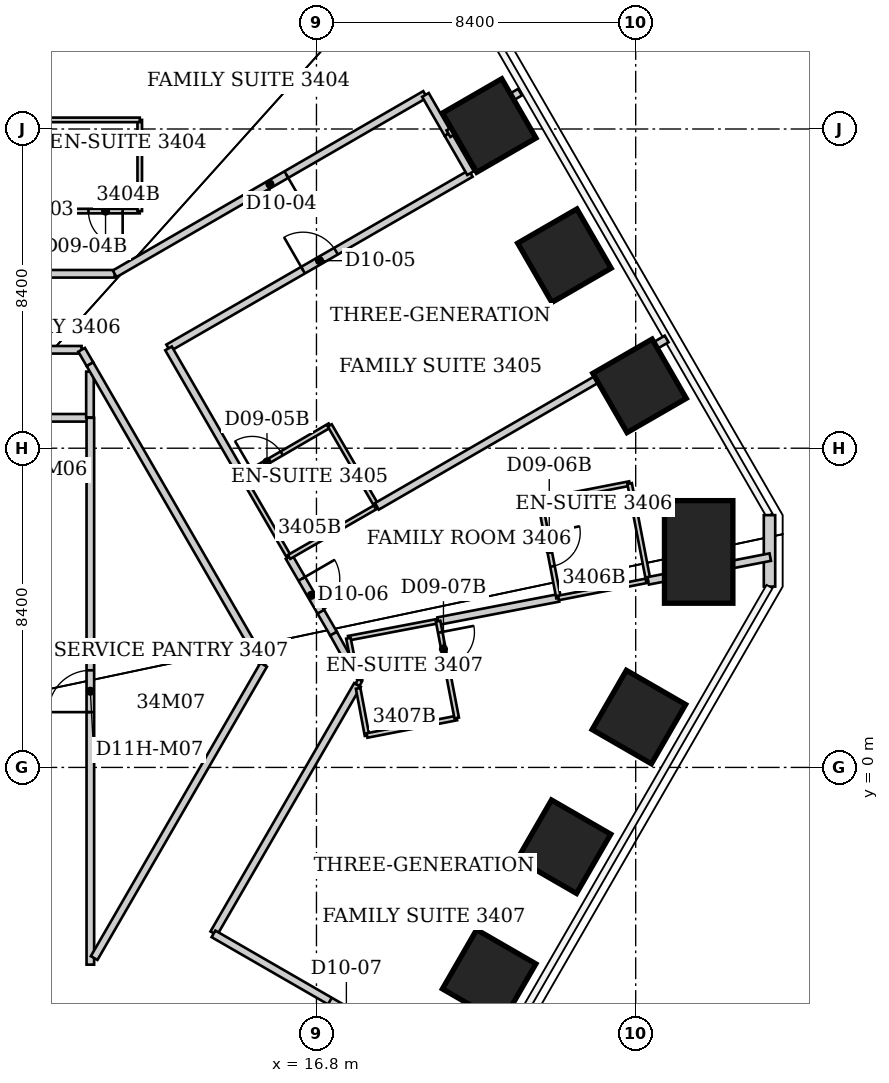
"""IFC4 building model, lengths in metres.
Left out: names, types, materials, properties, quantities, classifications, styles, units other than length and angle.
Written with IfcOpenShell. Run it as: python <this file> out.ifc"""

import sys

from ifc_helpers import new_model, si_unit, direction, frame, frame_2d, origin, origin_2d, place, context, subcontext, project, spatial, rectangle, extrude, element, fill, save


model = new_model("IFC4")
c1 = context("Model", 3, precision=1e-05, world=origin(), true_north=direction((0.0, 1.0)))
c2 = subcontext(c1, "Body", "Model", "MODEL_VIEW")
j1 = project(units=[si_unit("LENGTHUNIT", "METRE"), si_unit("PLANEANGLEUNIT", "RADIAN")], contexts=[c1])
p1 = place(None, origin())
s1 = spatial("IfcSite", under=j1, at=p1, CompositionType="ELEMENT")
p2 = place(p1, origin())
s2 = spatial("IfcBuilding", under=s1, at=p2, CompositionType="ELEMENT")
p3 = place(p2, frame((0.0, 0.0, 138.6)))
s3 = spatial("IfcBuildingStorey", under=s2, at=p3, CompositionType="ELEMENT", Elevation=138.6)
for number, where, z_axis, x_axis in (
    (1, (21.346, 16.891, 0.0), (0.0, 0.0, 1.0), (0.866, 0.5, 0.0)),
    (2, (23.324, 13.466, 0.0), (0.0, 0.0, 1.0), (0.866, 0.5, 0.0)),
    (3, (25.302, 10.041, 0.0), (0.0, 0.0, 1.0), (0.866, 0.5, 0.0)),
):
    element("IfcColumn", number, at=place(p3, frame(where, z_axis=z_axis, x_axis=x_axis)), inside=s3, PredefinedType="COLUMN", context=c2, shape_type="SweptSolid", body=[
        extrude(rectangle(XDim=1.8, YDim=1.8, at=origin_2d()), origin(), (0.0, 0.0, 1.0), 3.8),
    ])
p4 = place(p3, frame((26.857, 5.67, 0.0), z_axis=(0.0, 0.0, 1.0), x_axis=(1.0, 0.0, 0.0)))
e4 = element("IfcColumn", 4, at=p4, inside=s3, PredefinedType="COLUMN", context=c2, shape_type="SweptSolid", body=[
    extrude(rectangle(XDim=1.8, YDim=2.7, at=origin_2d()), origin(), (0.0, 0.0, 1.0), 3.8),
])
for number, where, z_axis, x_axis in (
    (5, (25.284, 1.325, 0.0), (0.0, 0.0, 1.0), (0.866, -0.5, 0.0)),
    (6, (23.314, -2.087, 0.0), (0.0, 0.0, 1.0), (0.866, -0.5, 0.0)),
    (7, (21.344, -5.499, 0.0), (0.0, 0.0, 1.0), (0.866, -0.5, 0.0)),
):
    element("IfcColumn", number, at=place(p3, frame(where, z_axis=z_axis, x_axis=x_axis)), inside=s3, PredefinedType="COLUMN", context=c2, shape_type="SweptSolid", body=[
        extrude(rectangle(XDim=1.8, YDim=1.8, at=origin_2d()), origin(), (0.0, 0.0, 1.0), 3.8),
    ])
p5 = place(p3, frame((28.721, 6.638, 0.0), z_axis=(0.0, 0.0, 1.0), x_axis=(0.0, -1.0, 0.0)))
e8 = element("IfcWall", 8, at=p5, inside=s3, PredefinedType="SOLIDWALL", context=c2, shape_type="SweptSolid", body=[
    extrude(rectangle(XDim=1.88, YDim=0.3, at=frame_2d((0.94, 0.0))), origin(), (0.0, 0.0, 1.0), 3.64),
])
p6 = place(p3, frame((6.27, 10.99, 0.0), z_axis=(0.0, 0.0, 1.0), x_axis=(1.0, 0.0, 0.0)))
e9 = element("IfcWall", 9, at=p6, inside=s3, PredefinedType="PARTITIONING", context=c2, shape_type="SweptSolid", body=[
    extrude(rectangle(XDim=4.35, YDim=0.2, at=frame_2d((2.175, 0.0))), origin(), (0.0, 0.0, 1.0), 3.64),
])
p7 = place(p3, frame((9.55, 14.64, 0.0), z_axis=(0.0, 0.0, 1.0), x_axis=(1.0, 0.0, 0.0)))
e10 = element("IfcWall", 10, at=p7, inside=s3, PredefinedType="PARTITIONING", context=c2, shape_type="SweptSolid", body=[
    extrude(rectangle(XDim=2.6, YDim=0.12, at=frame_2d((1.3, 0.0))), origin(), (0.0, 0.0, 1.0), 3.64),
])
p8 = place(p7, frame((1.25, 0.0, 0.0)))
e11 = element("IfcOpeningElement", 11, at=p8, cuts=e10, PredefinedType="OPENING", context=c2, shape_type="SweptSolid", body=[
    extrude(rectangle(XDim=0.9, YDim=2.03, at=frame_2d((0.45, 1.015))), frame((0.0, 0.06, 0.0), z_axis=(0.0, -1.0, 0.0), x_axis=(1.0, 0.0, 0.0)), (0.0, 0.0, 1.0), 0.12),
])
p9 = place(p3, frame((10.62, 10.99, 0.0), z_axis=(0.0, 0.0, 1.0), x_axis=(0.5011020393, -0.865388205495, 0.0)))
e12 = element("IfcWall", 12, at=p9, inside=s3, PredefinedType="PARTITIONING", context=c2, shape_type="SweptSolid", body=[
    extrude(rectangle(XDim=0.439, YDim=0.2, at=frame_2d((0.219, 0.0))), origin(), (0.0, 0.0, 1.0), 3.64),
])
p10 = place(p3, frame((10.84, 9.2, 0.0), z_axis=(0.0, 0.0, 1.0), x_axis=(-1.0, 0.0, 0.0)))
e13 = element("IfcWall", 13, at=p10, inside=s3, PredefinedType="PARTITIONING", context=c2, shape_type="SweptSolid", body=[
    extrude(rectangle(XDim=4.57, YDim=0.2, at=frame_2d((2.285, 0.0))), origin(), (0.0, 0.0, 1.0), 3.64),
])
p11 = place(p10, frame((1.735, 0.0, 0.0)))
e14 = element("IfcOpeningElement", 14, at=p11, cuts=e13, PredefinedType="OPENING", context=c2, shape_type="SweptSolid", body=[
    extrude(rectangle(XDim=1.1, YDim=2.2, at=frame_2d((0.55, 1.1))), frame((0.0, 0.1, 0.0), z_axis=(0.0, -1.0, 0.0), x_axis=(1.0, 0.0, 0.0)), (0.0, 0.0, 1.0), 0.2),
])
p12 = place(p3, frame((10.84, 10.415, 0.0), z_axis=(0.0, 0.0, 1.0), x_axis=(0.0, -1.0, 0.0)))
e15 = element("IfcWall", 15, at=p12, inside=s3, PredefinedType="PARTITIONING", context=c2, shape_type="SweptSolid", body=[
    extrude(rectangle(XDim=1.205, YDim=0.2, at=frame_2d((0.603, 0.0))), origin(), (0.0, 0.0, 1.0), 3.64),
])
p13 = place(p3, frame((10.84, 10.61, 0.0), z_axis=(0.0, 0.0, 1.0), x_axis=(0.500237524763, -0.865888225361, 0.0)))
e16 = element("IfcWall", 16, at=p13, inside=s3, PredefinedType="PARTITIONING", context=c2, shape_type="SweptSolid", body=[
    extrude(rectangle(XDim=9.135, YDim=0.2, at=frame_2d((4.568, 0.0))), origin(), (0.0, 0.0, 1.0), 3.64),
])
p14 = place(p3, frame((10.85, -5.19, 0.0), z_axis=(0.0, 0.0, 1.0), x_axis=(0.0, 1.0, 0.0)))
e17 = element("IfcWall", 17, at=p14, inside=s3, PredefinedType="PARTITIONING", context=c2, shape_type="SweptSolid", body=[
    extrude(rectangle(XDim=14.39, YDim=0.2, at=frame_2d((7.195, 0.0))), origin(), (0.0, 0.0, 1.0), 3.64),
])
p15 = place(p14, frame((6.645, 0.0, 0.0)))
e18 = element("IfcOpeningElement", 18, at=p15, cuts=e17, PredefinedType="OPENING", context=c2, shape_type="SweptSolid", body=[
    extrude(rectangle(XDim=1.1, YDim=2.2, at=frame_2d((0.55, 1.1))), frame((0.0, 0.1, 0.0), z_axis=(0.0, -1.0, 0.0), x_axis=(1.0, 0.0, 0.0)), (0.0, 0.0, 1.0), 0.2),
])
p16 = place(p3, frame((11.49, 12.99, 0.0), z_axis=(0.0, 0.0, 1.0), x_axis=(-1.0, 0.0, 0.0)))
e19 = element("IfcWall", 19, at=p16, inside=s3, PredefinedType="PARTITIONING", context=c2, shape_type="SweptSolid", body=[
    extrude(rectangle(XDim=1.94, YDim=0.2, at=frame_2d((0.97, 0.0))), origin(), (0.0, 0.0, 1.0), 3.64),
])
p17 = place(p3, frame((12.15, 14.64, 0.0), z_axis=(0.0, 0.0, 1.0), x_axis=(0.0, 1.0, 0.0)))
e20 = element("IfcWall", 20, at=p17, inside=s3, PredefinedType="PARTITIONING", context=c2, shape_type="SweptSolid", body=[
    extrude(rectangle(XDim=2.4, YDim=0.12, at=frame_2d((1.2, 0.0))), origin(), (0.0, 0.0, 1.0), 3.64),
])
p18 = place(p3, frame((12.15, 17.04, 0.0), z_axis=(0.0, 0.0, 1.0), x_axis=(-1.0, 0.0, 0.0)))
e21 = element("IfcWall", 21, at=p18, inside=s3, PredefinedType="PARTITIONING", context=c2, shape_type="SweptSolid", body=[
    extrude(rectangle(XDim=2.6, YDim=0.12, at=frame_2d((1.3, 0.0))), origin(), (0.0, 0.0, 1.0), 3.64),
])
p19 = place(p3, frame((12.9, 11.04, 0.0), z_axis=(0.0, 0.0, 1.0), x_axis=(0.866295705695, 0.499531530832, 0.0)))
e22 = element("IfcWall", 22, at=p19, inside=s3, PredefinedType="PARTITIONING", context=c2, shape_type="SweptSolid", body=[
    extrude(rectangle(XDim=9.189, YDim=0.2, at=frame_2d((4.594, 0.0))), origin(), (0.0, 0.0, 1.0), 3.64),
])
p20 = place(p19, frame((4.094, 0.0, 0.0)))
e23 = element("IfcOpeningElement", 23, at=p20, cuts=e22, PredefinedType="OPENING", context=c2, shape_type="SweptSolid", body=[
    extrude(rectangle(XDim=1.0, YDim=2.13, at=frame_2d((0.5, 1.065))), frame((0.0, 0.1, 0.0), z_axis=(0.0, -1.0, 0.0), x_axis=(1.0, 0.0, 0.0)), (0.0, 0.0, 1.0), 0.2),
])
p21 = place(p3, frame((12.907, 11.027, 0.0), z_axis=(0.0, 0.0, 1.0), x_axis=(0.499726078095, -0.86618349492, 0.0)))
e24 = element("IfcWall", 24, at=p21, inside=s3, PredefinedType="PARTITIONING", context=c2, shape_type="SweptSolid", body=[
    extrude(rectangle(XDim=3.887, YDim=0.2, at=frame_2d((1.944, 0.0))), origin(), (0.0, 0.0, 1.0), 3.64),
])
p22 = place(p3, frame((14.097, -4.367, 0.0), z_axis=(0.0, 0.0, 1.0), x_axis=(0.500859137679, 0.865528811885, 0.0)))
e25 = element("IfcWall", 25, at=p22, inside=s3, PredefinedType="PARTITIONING", context=c2, shape_type="SweptSolid", body=[
    extrude(rectangle(XDim=7.552, YDim=0.2, at=frame_2d((3.776, 0.0))), origin(), (0.0, 0.0, 1.0), 3.64),
])
p23 = place(p3, frame((14.85, 7.66, 0.0), z_axis=(0.0, 0.0, 1.0), x_axis=(0.501236510024, -0.865310326426, 0.0)))
e26 = element("IfcWall", 26, at=p23, inside=s3, PredefinedType="PARTITIONING", context=c2, shape_type="SweptSolid", body=[
    extrude(rectangle(XDim=2.451, YDim=0.12, at=frame_2d((1.226, 0.0))), origin(), (0.0, 0.0, 1.0), 3.64),
])
p24 = place(p3, frame((15.41, 2.7, 0.0), z_axis=(0.0, 0.0, 1.0), x_axis=(-0.500372062762, -0.865810486658, 0.0)))
e27 = element("IfcWall", 27, at=p24, inside=s3, PredefinedType="PARTITIONING", context=c2, shape_type="SweptSolid", body=[
    extrude(rectangle(XDim=8.913, YDim=0.2, at=frame_2d((4.457, 0.0))), origin(), (0.0, 0.0, 1.0), 3.64),
])
p25 = place(p3, frame((16.079, 5.539, 0.0), z_axis=(0.0, 0.0, 1.0), x_axis=(0.501782258451, -0.864993968247, 0.0)))
e28 = element("IfcWall", 28, at=p25, inside=s3, PredefinedType="PARTITIONING", context=c2, shape_type="SweptSolid", body=[
    extrude(rectangle(XDim=2.334, YDim=0.2, at=frame_2d((1.167, 0.0))), origin(), (0.0, 0.0, 1.0), 3.64),
])
p26 = place(p25, frame((0.667, 0.0, 0.0)))
e29 = element("IfcOpeningElement", 29, at=p26, cuts=e28, PredefinedType="OPENING", context=c2, shape_type="SweptSolid", body=[
    extrude(rectangle(XDim=1.0, YDim=2.13, at=frame_2d((0.5, 1.065))), frame((0.0, 0.1, 0.0), z_axis=(0.0, -1.0, 0.0), x_axis=(1.0, 0.0, 0.0)), (0.0, 0.0, 1.0), 0.2),
])
p27 = place(p3, frame((16.08, 5.54, 0.0), z_axis=(0.0, 0.0, 1.0), x_axis=(0.86663205897, 0.498947767172, 0.0)))
e30 = element("IfcWall", 30, at=p27, inside=s3, PredefinedType="PARTITIONING", context=c2, shape_type="SweptSolid", body=[
    extrude(rectangle(XDim=2.665, YDim=0.12, at=frame_2d((1.333, 0.0))), origin(), (0.0, 0.0, 1.0), 3.64),
])
p28 = place(p3, frame((17.15, 9.0, 0.0), z_axis=(0.0, 0.0, 1.0), x_axis=(-0.864018325232, -0.503460359575, 0.0)))
e31 = element("IfcWall", 31, at=p28, inside=s3, PredefinedType="PARTITIONING", context=c2, shape_type="SweptSolid", body=[
    extrude(rectangle(XDim=2.662, YDim=0.12, at=frame_2d((1.331, 0.0))), origin(), (0.0, 0.0, 1.0), 3.64),
])
p29 = place(p28, frame((1.462, 0.0, 0.0)))
e32 = element("IfcOpeningElement", 32, at=p29, cuts=e31, PredefinedType="OPENING", context=c2, shape_type="SweptSolid", body=[
    extrude(rectangle(XDim=0.9, YDim=2.03, at=frame_2d((0.45, 1.015))), frame((0.0, 0.06, 0.0), z_axis=(0.0, -1.0, 0.0), x_axis=(1.0, 0.0, 0.0)), (0.0, 0.0, 1.0), 0.12),
])
p30 = place(p3, frame((17.25, 3.52, 0.0), z_axis=(0.0, 0.0, 1.0), x_axis=(0.485489114803, -0.874242711956, 0.0)))
e33 = element("IfcWall", 33, at=p30, inside=s3, PredefinedType="PARTITIONING", context=c2, shape_type="SweptSolid", body=[
    extrude(rectangle(XDim=0.674, YDim=0.2, at=frame_2d((0.337, 0.0))), origin(), (0.0, 0.0, 1.0), 3.64),
])
p31 = place(p3, frame((17.64, 3.4, 0.0), z_axis=(0.0, 0.0, 1.0), x_axis=(0.982288725898, 0.187373581313, 0.0)))
e34 = element("IfcWall", 34, at=p31, inside=s3, PredefinedType="PARTITIONING", context=c2, shape_type="SweptSolid", body=[
    extrude(rectangle(XDim=2.403, YDim=0.12, at=frame_2d((1.201, 0.0))), origin(), (0.0, 0.0, 1.0), 3.64),
])
p32 = place(p3, frame((17.72, 2.7, 0.0), z_axis=(0.0, 0.0, 1.0), x_axis=(0.498530782172, -0.866871997025, 0.0)))
e35 = element("IfcWall", 35, at=p32, inside=s3, PredefinedType="PARTITIONING", context=c2, shape_type="SweptSolid", body=[
    extrude(rectangle(XDim=0.461, YDim=0.12, at=frame_2d((0.231, 0.0))), origin(), (0.0, 0.0, 1.0), 3.64),
])
p33 = place(p3, frame((17.774, 2.731, 0.0), z_axis=(0.0, 0.0, 1.0), x_axis=(-0.196253874553, 0.980553117747, 0.0)))
e36 = element("IfcWall", 36, at=p33, inside=s3, PredefinedType="PARTITIONING", context=c2, shape_type="SweptSolid", body=[
    extrude(rectangle(XDim=0.682, YDim=0.12, at=frame_2d((0.341, 0.0))), origin(), (0.0, 0.0, 1.0), 3.64),
])
p34 = place(p3, frame((17.88, 2.17, 0.0), z_axis=(0.0, 0.0, 1.0), x_axis=(0.474099823035, 0.880471099922, 0.0)))
e37 = element("IfcWall", 37, at=p34, inside=s3, PredefinedType="PARTITIONING", context=c2, shape_type="SweptSolid", body=[
    extrude(rectangle(XDim=0.148, YDim=0.12, at=frame_2d((0.074, 0.0))), origin(), (0.0, 0.0, 1.0), 3.64),
])
p35 = place(p3, frame((17.897, 2.082, 0.0), z_axis=(0.0, 0.0, 1.0), x_axis=(0.184580266957, -0.982817442382, 0.0)))
e38 = element("IfcWall", 38, at=p35, inside=s3, PredefinedType="PARTITIONING", context=c2, shape_type="SweptSolid", body=[
    extrude(rectangle(XDim=1.263, YDim=0.12, at=frame_2d((0.632, 0.0))), origin(), (0.0, 0.0, 1.0), 3.64),
])
p36 = place(p3, frame((18.13, 0.84, 0.0), z_axis=(0.0, 0.0, 1.0), x_axis=(0.981533392326, 0.191290877329, 0.0)))
e39 = element("IfcWall", 39, at=p36, inside=s3, PredefinedType="PARTITIONING", context=c2, shape_type="SweptSolid", body=[
    extrude(rectangle(XDim=2.405, YDim=0.12, at=frame_2d((1.202, 0.0))), origin(), (0.0, 0.0, 1.0), 3.64),
])
p37 = place(p3, frame((18.39, 6.87, 0.0), z_axis=(0.0, 0.0, 1.0), x_axis=(-0.503131731744, 0.864209731785, 0.0)))
e40 = element("IfcWall", 40, at=p37, inside=s3, PredefinedType="PARTITIONING", context=c2, shape_type="SweptSolid", body=[
    extrude(rectangle(XDim=2.465, YDim=0.12, at=frame_2d((1.232, 0.0))), origin(), (0.0, 0.0, 1.0), 3.64),
])
p38 = place(p3, frame((18.39, 6.87, 0.0), z_axis=(0.0, 0.0, 1.0), x_axis=(0.865875215531, 0.500260043506, 0.0)))
e41 = element("IfcWall", 41, at=p38, inside=s3, PredefinedType="PARTITIONING", context=c2, shape_type="SweptSolid", body=[
    extrude(rectangle(XDim=8.805, YDim=0.2, at=frame_2d((4.402, 0.0))), origin(), (0.0, 0.0, 1.0), 3.64),
])
p39 = place(p3, frame((19.66, 17.71, 0.0), z_axis=(0.0, 0.0, 1.0), x_axis=(-0.865884749539, -0.500243541204, 0.0)))
e42 = element("IfcWall", 42, at=p39, inside=s3, PredefinedType="PARTITIONING", context=c2, shape_type="SweptSolid", body=[
    extrude(rectangle(XDim=9.435, YDim=0.2, at=frame_2d((4.718, 0.0))), origin(), (0.0, 0.0, 1.0), 3.64),
])
p40 = place(p39, frame((4.218, 0.0, 0.0)))
e43 = element("IfcOpeningElement", 43, at=p40, cuts=e42, PredefinedType="OPENING", context=c2, shape_type="SweptSolid", body=[
    extrude(rectangle(XDim=1.0, YDim=2.13, at=frame_2d((0.5, 1.065))), frame((0.0, 0.1, 0.0), z_axis=(0.0, -1.0, 0.0), x_axis=(1.0, 0.0, 0.0)), (0.0, 0.0, 1.0), 0.2),
])
p41 = place(p3, frame((19.667, 17.697, 0.0), z_axis=(0.0, 0.0, 1.0), x_axis=(0.499704629046, -0.866195869137, 0.0)))
e44 = element("IfcWall", 44, at=p41, inside=s3, PredefinedType="PARTITIONING", context=c2, shape_type="SweptSolid", body=[
    extrude(rectangle(XDim=1.186, YDim=0.2, at=frame_2d((0.593, 0.0))), origin(), (0.0, 0.0, 1.0), 3.64),
])
p42 = place(p3, frame((20.0, 3.85, 0.0), z_axis=(0.0, 0.0, 1.0), x_axis=(0.981991339242, 0.188925936955, 0.0)))
e45 = element("IfcWall", 45, at=p42, inside=s3, PredefinedType="PARTITIONING", context=c2, shape_type="SweptSolid", body=[
    extrude(rectangle(XDim=3.228, YDim=0.2, at=frame_2d((1.614, 0.0))), origin(), (0.0, 0.0, 1.0), 3.64),
])
p43 = place(p3, frame((20.26, 16.67, 0.0), z_axis=(0.0, 0.0, 1.0), x_axis=(0.499734288277, -0.866178758179, 0.0)))
e46 = element("IfcWall", 46, at=p43, inside=s3, PredefinedType="PARTITIONING", context=c2, shape_type="SweptSolid", body=[
    extrude(rectangle(XDim=1.191, YDim=0.2, at=frame_2d((0.595, 0.0))), origin(), (0.0, 0.0, 1.0), 3.64),
])
p44 = place(p3, frame((20.49, 1.3, 0.0), z_axis=(0.0, 0.0, 1.0), x_axis=(-0.188697442844, 0.982035271802, 0.0)))
e47 = element("IfcWall", 47, at=p44, inside=s3, PredefinedType="PARTITIONING", context=c2, shape_type="SweptSolid", body=[
    extrude(rectangle(XDim=2.597, YDim=0.12, at=frame_2d((1.298, 0.0))), origin(), (0.0, 0.0, 1.0), 3.64),
])
p45 = place(p44, frame((1.397, 0.0, 0.0)))
e48 = element("IfcOpeningElement", 48, at=p45, cuts=e47, PredefinedType="OPENING", context=c2, shape_type="SweptSolid", body=[
    extrude(rectangle(XDim=0.9, YDim=2.03, at=frame_2d((0.45, 1.015))), frame((0.0, 0.06, 0.0), z_axis=(0.0, -1.0, 0.0), x_axis=(1.0, 0.0, 0.0)), (0.0, 0.0, 1.0), 0.12),
])
p46 = place(p3, frame((21.084, -8.415, 0.0), z_axis=(0.0, 0.0, 1.0), x_axis=(-0.866174008169, 0.499742521277, 0.0)))
e49 = element("IfcWall", 49, at=p46, inside=s3, PredefinedType="PARTITIONING", context=c2, shape_type="SweptSolid", body=[
    extrude(rectangle(XDim=8.074, YDim=0.2, at=frame_2d((4.037, 0.0))), origin(), (0.0, 0.0, 1.0), 3.64),
])
p47 = place(p46, frame((3.537, 0.0, 0.0)))
e50 = element("IfcOpeningElement", 50, at=p47, cuts=e49, PredefinedType="OPENING", context=c2, shape_type="SweptSolid", body=[
    extrude(rectangle(XDim=1.0, YDim=2.13, at=frame_2d((0.5, 1.065))), frame((0.0, 0.1, 0.0), z_axis=(0.0, -1.0, 0.0), x_axis=(1.0, 0.0, 0.0)), (0.0, 0.0, 1.0), 0.2),
])
p48 = place(p3, frame((22.156, 17.77, 0.0), z_axis=(0.0, 0.0, 1.0), x_axis=(-0.865037029405, -0.501708020425, 0.0)))
e51 = element("IfcWall", 51, at=p48, inside=s3, PredefinedType="PARTITIONING", context=c2, shape_type="SweptSolid", body=[
    extrude(rectangle(XDim=2.177, YDim=0.2, at=frame_2d((1.089, 0.0))), origin(), (0.0, 0.0, 1.0), 3.64),
])
p49 = place(p3, frame((22.68, 7.01, 0.0), z_axis=(0.0, 0.0, 1.0), x_axis=(0.188697442844, -0.982035271802, 0.0)))
e52 = element("IfcWall", 52, at=p49, inside=s3, PredefinedType="PARTITIONING", context=c2, shape_type="SweptSolid", body=[
    extrude(rectangle(XDim=2.597, YDim=0.12, at=frame_2d((1.298, 0.0))), origin(), (0.0, 0.0, 1.0), 3.64),
])
p50 = place(p49, frame((0.85, 0.0, 0.0)))
e53 = element("IfcOpeningElement", 53, at=p50, cuts=e52, PredefinedType="OPENING", context=c2, shape_type="SweptSolid", body=[
    extrude(rectangle(XDim=0.9, YDim=2.03, at=frame_2d((0.45, 1.015))), frame((0.0, 0.06, 0.0), z_axis=(0.0, -1.0, 0.0), x_axis=(1.0, 0.0, 0.0)), (0.0, 0.0, 1.0), 0.12),
])
for number, where, z_axis, x_axis in (
    (54, (23.17, 4.46, 0.0), (0.0, 0.0, 1.0), (0.982, 0.191, 0.0)),
    (55, (25.04, 7.47, 0.0), (0.0, 0.0, 1.0), (-0.982, -0.191, 0.0)),
):
    element("IfcWall", number, at=place(p3, frame(where, z_axis=z_axis, x_axis=x_axis)), inside=s3, PredefinedType="PARTITIONING", context=c2, shape_type="SweptSolid", body=[
        extrude(rectangle(XDim=2.405, YDim=0.12, at=frame_2d((1.202, 0.0))), origin(), (0.0, 0.0, 1.0), 3.64),
    ])
p51 = place(p3, frame((25.53, 4.92, 0.0), z_axis=(0.0, 0.0, 1.0), x_axis=(-0.188697442844, 0.982035271802, 0.0)))
e56 = element("IfcWall", 56, at=p51, inside=s3, PredefinedType="PARTITIONING", context=c2, shape_type="SweptSolid", body=[
    extrude(rectangle(XDim=2.597, YDim=0.12, at=frame_2d((1.298, 0.0))), origin(), (0.0, 0.0, 1.0), 3.64),
])
p52 = place(p3, frame((28.74, 5.534, 0.0), z_axis=(0.0, 0.0, 1.0), x_axis=(-0.98161461266, -0.190873655101, 0.0)))
e57 = element("IfcWall", 57, at=p52, inside=s3, PredefinedType="PARTITIONING", context=c2, shape_type="SweptSolid", body=[
    extrude(rectangle(XDim=3.271, YDim=0.2, at=frame_2d((1.635, 0.0))), origin(), (0.0, 0.0, 1.0), 3.64),
])
p53 = place(p40, origin())
e58 = element("IfcDoor", 58, at=p53, inside=s3, OperationType="SINGLE_SWING_LEFT", PredefinedType="DOOR", context=c2, shape_type="SweptSolid", body=[
    extrude(rectangle(XDim=1.0, YDim=2.13, at=frame_2d((0.5, 1.065))), frame((0.0, 0.025, 0.0), z_axis=(0.0, -1.0, 0.0), x_axis=(1.0, 0.0, 0.0)), (0.0, 0.0, 1.0), 0.05),
])
fill(e43, e58)
p54 = place(p8, origin())
e59 = element("IfcDoor", 59, at=p54, inside=s3, OperationType="SINGLE_SWING_RIGHT", PredefinedType="DOOR", context=c2, shape_type="SweptSolid", body=[
    extrude(rectangle(XDim=0.9, YDim=2.03, at=frame_2d((0.45, 1.015))), frame((0.0, 0.025, 0.0), z_axis=(0.0, -1.0, 0.0), x_axis=(1.0, 0.0, 0.0)), (0.0, 0.0, 1.0), 0.05),
])
fill(e11, e59)
p55 = place(p20, origin())
e60 = element("IfcDoor", 60, at=p55, inside=s3, OperationType="SINGLE_SWING_LEFT", PredefinedType="DOOR", context=c2, shape_type="SweptSolid", body=[
    extrude(rectangle(XDim=1.0, YDim=2.13, at=frame_2d((0.5, 1.065))), frame((0.0, 0.025, 0.0), z_axis=(0.0, -1.0, 0.0), x_axis=(1.0, 0.0, 0.0)), (0.0, 0.0, 1.0), 0.05),
])
fill(e23, e60)
p56 = place(p29, origin())
e61 = element("IfcDoor", 61, at=p56, inside=s3, OperationType="SINGLE_SWING_RIGHT", PredefinedType="DOOR", context=c2, shape_type="SweptSolid", body=[
    extrude(rectangle(XDim=0.9, YDim=2.03, at=frame_2d((0.45, 1.015))), frame((0.0, 0.025, 0.0), z_axis=(0.0, -1.0, 0.0), x_axis=(1.0, 0.0, 0.0)), (0.0, 0.0, 1.0), 0.05),
])
fill(e32, e61)
p57 = place(p26, origin())
e62 = element("IfcDoor", 62, at=p57, inside=s3, OperationType="SINGLE_SWING_LEFT", PredefinedType="DOOR", context=c2, shape_type="SweptSolid", body=[
    extrude(rectangle(XDim=1.0, YDim=2.13, at=frame_2d((0.5, 1.065))), frame((0.0, 0.025, 0.0), z_axis=(0.0, -1.0, 0.0), x_axis=(1.0, 0.0, 0.0)), (0.0, 0.0, 1.0), 0.05),
])
fill(e29, e62)
p58 = place(p50, origin())
e63 = element("IfcDoor", 63, at=p58, inside=s3, OperationType="SINGLE_SWING_LEFT", PredefinedType="DOOR", context=c2, shape_type="SweptSolid", body=[
    extrude(rectangle(XDim=0.9, YDim=2.03, at=frame_2d((0.45, 1.015))), frame((0.0, 0.025, 0.0), z_axis=(0.0, -1.0, 0.0), x_axis=(1.0, 0.0, 0.0)), (0.0, 0.0, 1.0), 0.05),
])
fill(e53, e63)
p59 = place(p47, origin())
e64 = element("IfcDoor", 64, at=p59, inside=s3, OperationType="SINGLE_SWING_LEFT", PredefinedType="DOOR", context=c2, shape_type="SweptSolid", body=[
    extrude(rectangle(XDim=1.0, YDim=2.13, at=frame_2d((0.5, 1.065))), frame((0.0, 0.025, 0.0), z_axis=(0.0, -1.0, 0.0), x_axis=(1.0, 0.0, 0.0)), (0.0, 0.0, 1.0), 0.05),
])
fill(e50, e64)
p60 = place(p45, origin())
e65 = element("IfcDoor", 65, at=p60, inside=s3, OperationType="SINGLE_SWING_RIGHT", PredefinedType="DOOR", context=c2, shape_type="SweptSolid", body=[
    extrude(rectangle(XDim=0.9, YDim=2.03, at=frame_2d((0.45, 1.015))), frame((0.0, 0.025, 0.0), z_axis=(0.0, -1.0, 0.0), x_axis=(1.0, 0.0, 0.0)), (0.0, 0.0, 1.0), 0.05),
])
fill(e48, e65)
p61 = place(p15, origin())
e66 = element("IfcDoor", 66, at=p61, inside=s3, OperationType="SINGLE_SWING_LEFT", PredefinedType="DOOR", context=c2, shape_type="SweptSolid", body=[
    extrude(rectangle(XDim=1.1, YDim=2.2, at=frame_2d((0.55, 1.1))), frame((0.0, 0.025, 0.0), z_axis=(0.0, -1.0, 0.0), x_axis=(1.0, 0.0, 0.0)), (0.0, 0.0, 1.0), 0.05),
])
fill(e18, e66)
save(model, sys.argv[1])
